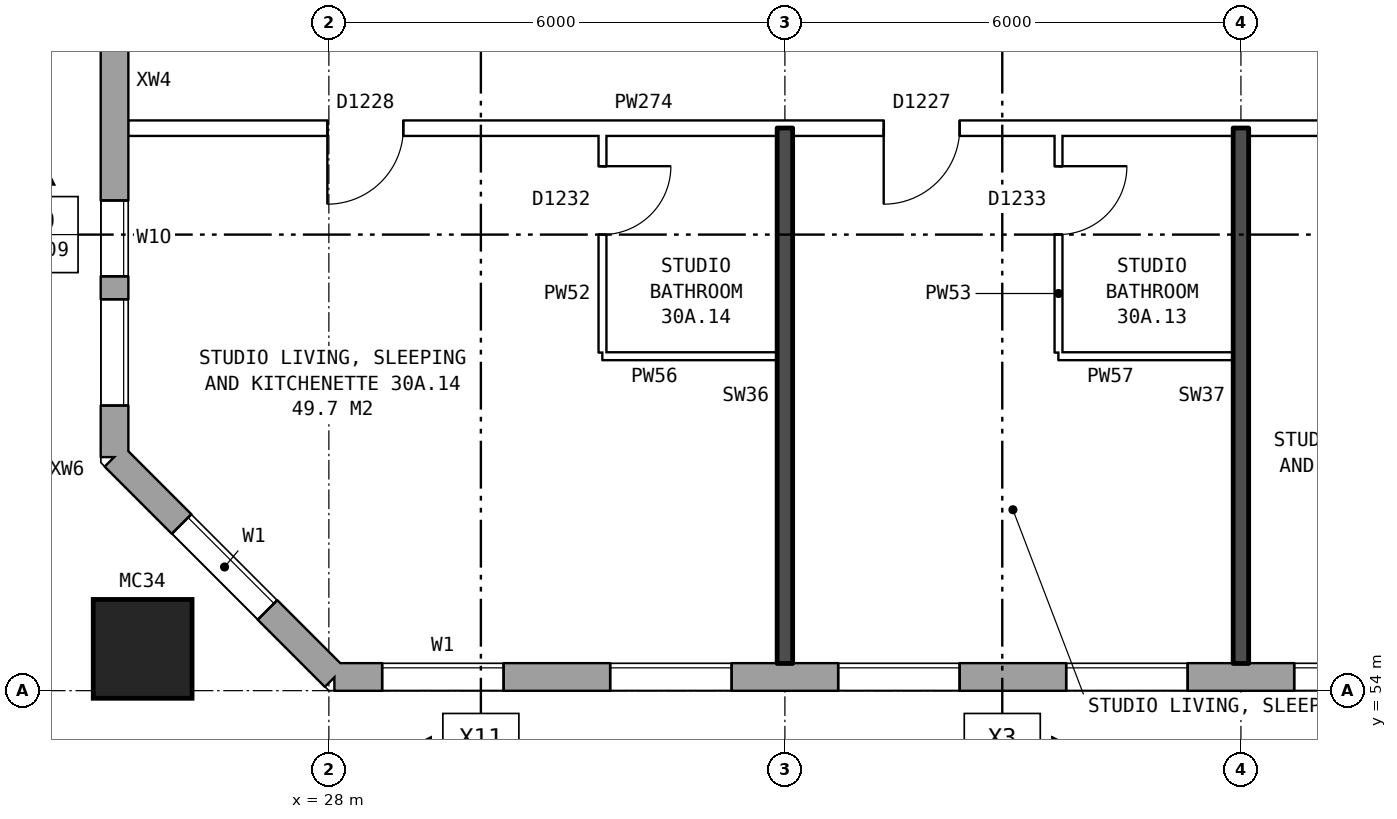
"""IFC4 building model, lengths in metres.
Left out: names, types, materials, properties, quantities, classifications, styles, units other than length and angle.
Written with IfcOpenShell. Run it as: python <this file> out.ifc"""

import sys

from ifc_helpers import new_model, si_unit, direction, frame, frame_2d, origin, origin_2d, place, context, subcontext, project, spatial, rectangle, hollow_rectangle, extrude, element, fill, save


model = new_model("IFC4")
c1 = context("Model", 3, precision=1e-05, world=origin(), true_north=direction((0.0, 1.0)))
c2 = subcontext(c1, "Body", "Model", "MODEL_VIEW")
j1 = project(units=[si_unit("LENGTHUNIT", "METRE"), si_unit("PLANEANGLEUNIT", "RADIAN")], contexts=[c1])
p1 = place(None, origin())
s1 = spatial("IfcSite", under=j1, at=p1, CompositionType="ELEMENT")
p2 = place(p1, origin())
s2 = spatial("IfcBuilding", under=s1, at=p2, CompositionType="ELEMENT")
p3 = place(p2, frame((0.0, 0.0, 108.8)))
s3 = spatial("IfcBuildingStorey", under=s2, at=p3, CompositionType="ELEMENT", Elevation=108.8)
p4 = place(p3, frame((25.55, 54.55, 0.0), z_axis=(0.0, 0.0, 1.0), x_axis=(1.0, 0.0, 0.0)))
e1 = element("IfcColumn", 1, at=p4, inside=s3, PredefinedType="COLUMN", context=c2, shape_type="SweptSolid", body=[
    extrude(hollow_rectangle(XDim=1.3, YDim=1.3, WallThickness=0.07, at=origin_2d()), origin(), (0.0, 0.0, 1.0), 3.1),
])
p5 = place(p3, frame((25.18, 57.075, 0.0), z_axis=(0.0, 0.0, 1.0), x_axis=(0.707106781187, -0.707106781187, 0.0)))
e2 = element("IfcWall", 2, at=p5, inside=s3, PredefinedType="STANDARD", context=c2, shape_type="SweptSolid", body=[
    extrude(rectangle(XDim=4.094, YDim=0.36, at=frame_2d((2.047, 0.0))), origin(), (0.0, 0.0, 1.0), 2.85),
])
p6 = place(p5, frame((1.247, 0.0, 0.8)))
e3 = element("IfcOpeningElement", 3, at=p6, cuts=e2, PredefinedType="OPENING", context=c2, shape_type="SweptSolid", body=[
    extrude(rectangle(XDim=1.6, YDim=1.8, at=frame_2d((0.8, 0.9))), frame((0.0, 0.19, 0.0), z_axis=(0.0, -1.0, 0.0), x_axis=(1.0, 0.0, 0.0)), (0.0, 0.0, 1.0), 0.38),
])
p7 = place(p3, frame((28.075, 54.18, 0.0), z_axis=(0.0, 0.0, 1.0), x_axis=(1.0, 0.0, 0.0)))
e4 = element("IfcWall", 4, at=p7, inside=s3, PredefinedType="STANDARD", context=c2, shape_type="SweptSolid", body=[
    extrude(rectangle(XDim=44.851, YDim=0.36, at=frame_2d((22.425, 0.0))), origin(), (0.0, 0.0, 1.0), 2.85),
])
p8 = place(p7, frame((0.625, 0.0, 0.8)))
e5 = element("IfcOpeningElement", 5, at=p8, cuts=e4, PredefinedType="OPENING", context=c2, shape_type="SweptSolid", body=[
    extrude(rectangle(XDim=1.6, YDim=1.8, at=frame_2d((0.8, 0.9))), frame((0.0, 0.19, 0.0), z_axis=(0.0, -1.0, 0.0), x_axis=(1.0, 0.0, 0.0)), (0.0, 0.0, 1.0), 0.38),
])
p9 = place(p7, frame((3.625, 0.0, 0.8)))
e6 = element("IfcOpeningElement", 6, at=p9, cuts=e4, PredefinedType="OPENING", context=c2, shape_type="SweptSolid", body=[
    extrude(rectangle(XDim=1.6, YDim=1.8, at=frame_2d((0.8, 0.9))), frame((0.0, 0.19, 0.0), z_axis=(0.0, -1.0, 0.0), x_axis=(1.0, 0.0, 0.0)), (0.0, 0.0, 1.0), 0.38),
])
p10 = place(p7, frame((6.625, 0.0, 0.8)))
e7 = element("IfcOpeningElement", 7, at=p10, cuts=e4, PredefinedType="OPENING", context=c2, shape_type="SweptSolid", body=[
    extrude(rectangle(XDim=1.6, YDim=1.8, at=frame_2d((0.8, 0.9))), frame((0.0, 0.19, 0.0), z_axis=(0.0, -1.0, 0.0), x_axis=(1.0, 0.0, 0.0)), (0.0, 0.0, 1.0), 0.38),
])
p11 = place(p7, frame((9.625, 0.0, 0.8)))
e8 = element("IfcOpeningElement", 8, at=p11, cuts=e4, PredefinedType="OPENING", context=c2, shape_type="SweptSolid", body=[
    extrude(rectangle(XDim=1.6, YDim=1.8, at=frame_2d((0.8, 0.9))), frame((0.0, 0.19, 0.0), z_axis=(0.0, -1.0, 0.0), x_axis=(1.0, 0.0, 0.0)), (0.0, 0.0, 1.0), 0.38),
])
p12 = place(p7, frame((12.625, 0.0, 0.8)))
e9 = element("IfcOpeningElement", 9, at=p12, cuts=e4, PredefinedType="OPENING", context=c2, shape_type="SweptSolid", body=[
    extrude(rectangle(XDim=1.6, YDim=1.8, at=frame_2d((0.8, 0.9))), frame((0.0, 0.19, 0.0), z_axis=(0.0, -1.0, 0.0), x_axis=(1.0, 0.0, 0.0)), (0.0, 0.0, 1.0), 0.38),
])
p13 = place(p7, frame((14.525, 0.0, 1.4)))
e10 = element("IfcOpeningElement", 10, at=p13, cuts=e4, PredefinedType="OPENING", context=c2, shape_type="SweptSolid", body=[
    extrude(rectangle(XDim=1.2, YDim=1.2, at=frame_2d((0.6, 0.6))), frame((0.0, 0.19, 0.0), z_axis=(0.0, -1.0, 0.0), x_axis=(1.0, 0.0, 0.0)), (0.0, 0.0, 1.0), 0.38),
])
p14 = place(p7, frame((18.625, 0.0, 0.8)))
e11 = element("IfcOpeningElement", 11, at=p14, cuts=e4, PredefinedType="OPENING", context=c2, shape_type="SweptSolid", body=[
    extrude(rectangle(XDim=1.6, YDim=1.8, at=frame_2d((0.8, 0.9))), frame((0.0, 0.19, 0.0), z_axis=(0.0, -1.0, 0.0), x_axis=(1.0, 0.0, 0.0)), (0.0, 0.0, 1.0), 0.38),
])
p15 = place(p7, frame((21.625, 0.0, 0.8)))
e12 = element("IfcOpeningElement", 12, at=p15, cuts=e4, PredefinedType="OPENING", context=c2, shape_type="SweptSolid", body=[
    extrude(rectangle(XDim=1.6, YDim=1.8, at=frame_2d((0.8, 0.9))), frame((0.0, 0.19, 0.0), z_axis=(0.0, -1.0, 0.0), x_axis=(1.0, 0.0, 0.0)), (0.0, 0.0, 1.0), 0.38),
])
p16 = place(p7, frame((24.625, 0.0, 0.8)))
e13 = element("IfcOpeningElement", 13, at=p16, cuts=e4, PredefinedType="OPENING", context=c2, shape_type="SweptSolid", body=[
    extrude(rectangle(XDim=1.6, YDim=1.8, at=frame_2d((0.8, 0.9))), frame((0.0, 0.19, 0.0), z_axis=(0.0, -1.0, 0.0), x_axis=(1.0, 0.0, 0.0)), (0.0, 0.0, 1.0), 0.38),
])
p17 = place(p7, frame((27.075, 0.0, 0.15)))
e14 = element("IfcOpeningElement", 14, at=p17, cuts=e4, PredefinedType="OPENING", context=c2, shape_type="SweptSolid", body=[
    extrude(rectangle(XDim=1.2, YDim=0.9, at=frame_2d((0.6, 0.45))), frame((0.0, 0.19, 0.0), z_axis=(0.0, -1.0, 0.0), x_axis=(1.0, 0.0, 0.0)), (0.0, 0.0, 1.0), 0.38),
])
p18 = place(p7, frame((30.625, 0.0, 0.8)))
e15 = element("IfcOpeningElement", 15, at=p18, cuts=e4, PredefinedType="OPENING", context=c2, shape_type="SweptSolid", body=[
    extrude(rectangle(XDim=1.6, YDim=1.8, at=frame_2d((0.8, 0.9))), frame((0.0, 0.19, 0.0), z_axis=(0.0, -1.0, 0.0), x_axis=(1.0, 0.0, 0.0)), (0.0, 0.0, 1.0), 0.38),
])
p19 = place(p7, frame((33.625, 0.0, 0.8)))
e16 = element("IfcOpeningElement", 16, at=p19, cuts=e4, PredefinedType="OPENING", context=c2, shape_type="SweptSolid", body=[
    extrude(rectangle(XDim=1.6, YDim=1.8, at=frame_2d((0.8, 0.9))), frame((0.0, 0.19, 0.0), z_axis=(0.0, -1.0, 0.0), x_axis=(1.0, 0.0, 0.0)), (0.0, 0.0, 1.0), 0.38),
])
p20 = place(p7, frame((36.625, 0.0, 0.8)))
e17 = element("IfcOpeningElement", 17, at=p20, cuts=e4, PredefinedType="OPENING", context=c2, shape_type="SweptSolid", body=[
    extrude(rectangle(XDim=1.6, YDim=1.8, at=frame_2d((0.8, 0.9))), frame((0.0, 0.19, 0.0), z_axis=(0.0, -1.0, 0.0), x_axis=(1.0, 0.0, 0.0)), (0.0, 0.0, 1.0), 0.38),
])
p21 = place(p7, frame((39.625, 0.0, 0.8)))
e18 = element("IfcOpeningElement", 18, at=p21, cuts=e4, PredefinedType="OPENING", context=c2, shape_type="SweptSolid", body=[
    extrude(rectangle(XDim=1.6, YDim=1.8, at=frame_2d((0.8, 0.9))), frame((0.0, 0.19, 0.0), z_axis=(0.0, -1.0, 0.0), x_axis=(1.0, 0.0, 0.0)), (0.0, 0.0, 1.0), 0.38),
])
p22 = place(p7, frame((42.625, 0.0, 0.8)))
e19 = element("IfcOpeningElement", 19, at=p22, cuts=e4, PredefinedType="OPENING", context=c2, shape_type="SweptSolid", body=[
    extrude(rectangle(XDim=1.6, YDim=1.8, at=frame_2d((0.8, 0.9))), frame((0.0, 0.19, 0.0), z_axis=(0.0, -1.0, 0.0), x_axis=(1.0, 0.0, 0.0)), (0.0, 0.0, 1.0), 0.38),
])
p23 = place(p7, frame((28.725, 0.0, 1.65)))
e20 = element("IfcOpeningElement", 20, at=p23, cuts=e4, PredefinedType="OPENING", context=c2, shape_type="SweptSolid", body=[
    extrude(rectangle(XDim=1.0, YDim=0.9, at=frame_2d((0.5, 0.45))), frame((0.0, 0.19, 0.0), z_axis=(0.0, -1.0, 0.0), x_axis=(1.0, 0.0, 0.0)), (0.0, 0.0, 1.0), 0.38),
])
p24 = place(p3, frame((25.18, 82.925, 0.0), z_axis=(0.0, 0.0, 1.0), x_axis=(0.0, -1.0, 0.0)))
e21 = element("IfcWall", 21, at=p24, inside=s3, PredefinedType="STANDARD", context=c2, shape_type="SweptSolid", body=[
    extrude(rectangle(XDim=25.851, YDim=0.36, at=frame_2d((12.925, 0.0))), origin(), (0.0, 0.0, 1.0), 2.85),
])
p25 = place(p24, frame((0.3, 0.0, 0.8)))
e22 = element("IfcOpeningElement", 22, at=p25, cuts=e21, PredefinedType="OPENING", context=c2, shape_type="SweptSolid", body=[
    extrude(rectangle(XDim=1.4, YDim=1.8, at=frame_2d((0.7, 0.9))), frame((0.0, 0.19, 0.0), z_axis=(0.0, -1.0, 0.0), x_axis=(1.0, 0.0, 0.0)), (0.0, 0.0, 1.0), 0.38),
])
p26 = place(p24, frame((5.525, 0.0, 1.4)))
e23 = element("IfcOpeningElement", 23, at=p26, cuts=e21, PredefinedType="OPENING", context=c2, shape_type="SweptSolid", body=[
    extrude(rectangle(XDim=1.4, YDim=1.2, at=frame_2d((0.7, 0.6))), frame((0.0, 0.19, 0.0), z_axis=(0.0, -1.0, 0.0), x_axis=(1.0, 0.0, 0.0)), (0.0, 0.0, 1.0), 0.38),
])
p27 = place(p24, frame((7.625, 0.0, 0.8)))
e24 = element("IfcOpeningElement", 24, at=p27, cuts=e21, PredefinedType="OPENING", context=c2, shape_type="SweptSolid", body=[
    extrude(rectangle(XDim=1.6, YDim=1.8, at=frame_2d((0.8, 0.9))), frame((0.0, 0.19, 0.0), z_axis=(0.0, -1.0, 0.0), x_axis=(1.0, 0.0, 0.0)), (0.0, 0.0, 1.0), 0.38),
])
p28 = place(p24, frame((10.625, 0.0, 0.8)))
e25 = element("IfcOpeningElement", 25, at=p28, cuts=e21, PredefinedType="OPENING", context=c2, shape_type="SweptSolid", body=[
    extrude(rectangle(XDim=1.6, YDim=1.8, at=frame_2d((0.8, 0.9))), frame((0.0, 0.19, 0.0), z_axis=(0.0, -1.0, 0.0), x_axis=(1.0, 0.0, 0.0)), (0.0, 0.0, 1.0), 0.38),
])
p29 = place(p24, frame((13.625, 0.0, 0.8)))
e26 = element("IfcOpeningElement", 26, at=p29, cuts=e21, PredefinedType="OPENING", context=c2, shape_type="SweptSolid", body=[
    extrude(rectangle(XDim=1.6, YDim=1.8, at=frame_2d((0.8, 0.9))), frame((0.0, 0.19, 0.0), z_axis=(0.0, -1.0, 0.0), x_axis=(1.0, 0.0, 0.0)), (0.0, 0.0, 1.0), 0.38),
])
p30 = place(p24, frame((16.625, 0.0, 0.8)))
e27 = element("IfcOpeningElement", 27, at=p30, cuts=e21, PredefinedType="OPENING", context=c2, shape_type="SweptSolid", body=[
    extrude(rectangle(XDim=1.6, YDim=1.8, at=frame_2d((0.8, 0.9))), frame((0.0, 0.19, 0.0), z_axis=(0.0, -1.0, 0.0), x_axis=(1.0, 0.0, 0.0)), (0.0, 0.0, 1.0), 0.38),
])
p31 = place(p24, frame((9.525, 0.0, 0.8)))
e28 = element("IfcOpeningElement", 28, at=p31, cuts=e21, PredefinedType="OPENING", context=c2, shape_type="SweptSolid", body=[
    extrude(rectangle(XDim=0.8, YDim=1.8, at=frame_2d((0.4, 0.9))), frame((0.0, 0.19, 0.0), z_axis=(0.0, -1.0, 0.0), x_axis=(1.0, 0.0, 0.0)), (0.0, 0.0, 1.0), 0.38),
])
p32 = place(p24, frame((22.475, 0.0, 0.8)))
e29 = element("IfcOpeningElement", 29, at=p32, cuts=e21, PredefinedType="OPENING", context=c2, shape_type="SweptSolid", body=[
    extrude(rectangle(XDim=1.0, YDim=1.2, at=frame_2d((0.5, 0.6))), frame((0.0, 0.19, 0.0), z_axis=(0.0, -1.0, 0.0), x_axis=(1.0, 0.0, 0.0)), (0.0, 0.0, 1.0), 0.38),
])
p33 = place(p24, frame((2.0, 0.0, 0.8)))
e30 = element("IfcOpeningElement", 30, at=p33, cuts=e21, PredefinedType="OPENING", context=c2, shape_type="SweptSolid", body=[
    extrude(rectangle(XDim=0.8, YDim=1.5, at=frame_2d((0.4, 0.75))), frame((0.0, 0.19, 0.0), z_axis=(0.0, -1.0, 0.0), x_axis=(1.0, 0.0, 0.0)), (0.0, 0.0, 1.0), 0.38),
])
p34 = place(p24, frame((12.525, 0.0, 0.8)))
e31 = element("IfcOpeningElement", 31, at=p34, cuts=e21, PredefinedType="OPENING", context=c2, shape_type="SweptSolid", body=[
    extrude(rectangle(XDim=0.8, YDim=1.8, at=frame_2d((0.4, 0.9))), frame((0.0, 0.19, 0.0), z_axis=(0.0, -1.0, 0.0), x_axis=(1.0, 0.0, 0.0)), (0.0, 0.0, 1.0), 0.38),
])
p35 = place(p24, frame((15.525, 0.0, 0.8)))
e32 = element("IfcOpeningElement", 32, at=p35, cuts=e21, PredefinedType="OPENING", context=c2, shape_type="SweptSolid", body=[
    extrude(rectangle(XDim=0.8, YDim=1.8, at=frame_2d((0.4, 0.9))), frame((0.0, 0.19, 0.0), z_axis=(0.0, -1.0, 0.0), x_axis=(1.0, 0.0, 0.0)), (0.0, 0.0, 1.0), 0.38),
])
p36 = place(p24, frame((18.525, 0.0, 0.8)))
e33 = element("IfcOpeningElement", 33, at=p36, cuts=e21, PredefinedType="OPENING", context=c2, shape_type="SweptSolid", body=[
    extrude(rectangle(XDim=0.8, YDim=1.8, at=frame_2d((0.4, 0.9))), frame((0.0, 0.19, 0.0), z_axis=(0.0, -1.0, 0.0), x_axis=(1.0, 0.0, 0.0)), (0.0, 0.0, 1.0), 0.38),
])
p37 = place(p24, frame((23.775, 0.0, 0.8)))
e34 = element("IfcOpeningElement", 34, at=p37, cuts=e21, PredefinedType="OPENING", context=c2, shape_type="SweptSolid", body=[
    extrude(rectangle(XDim=1.4, YDim=1.8, at=frame_2d((0.7, 0.9))), frame((0.0, 0.19, 0.0), z_axis=(0.0, -1.0, 0.0), x_axis=(1.0, 0.0, 0.0)), (0.0, 0.0, 1.0), 0.38),
])
for number, where, z_axis, x_axis in (
    (35, (31.6, 58.4, 0.0), (0.0, 0.0, 1.0), (1.0, 0.0, 0.0)),
    (36, (37.6, 58.4, 0.0), (0.0, 0.0, 1.0), (1.0, 0.0, 0.0)),
):
    element("IfcWall", number, at=place(p3, frame(where, z_axis=z_axis, x_axis=x_axis)), inside=s3, PredefinedType="PARTITIONING", context=c2, shape_type="SweptSolid", body=[
        extrude(rectangle(XDim=2.3, YDim=0.1, at=frame_2d((1.15, 0.0))), origin(), (0.0, 0.0, 1.0), 2.85),
    ])
p38 = place(p3, frame((25.36, 61.4, 0.0), z_axis=(0.0, 0.0, 1.0), x_axis=(1.0, 0.0, 0.0)))
e37 = element("IfcWall", 37, at=p38, inside=s3, PredefinedType="PARTITIONING", context=c2, shape_type="SweptSolid", body=[
    extrude(rectangle(XDim=20.54, YDim=0.2, at=frame_2d((10.27, 0.0))), origin(), (0.0, 0.0, 1.0), 2.85),
])
p39 = place(p38, frame((15.94, 0.0, 0.0)))
e38 = element("IfcOpeningElement", 38, at=p39, cuts=e37, PredefinedType="OPENING", context=c2, shape_type="SweptSolid", body=[
    extrude(rectangle(XDim=1.0, YDim=2.1, at=frame_2d((0.5, 1.05))), frame((0.0, 0.11, 0.0), z_axis=(0.0, -1.0, 0.0), x_axis=(1.0, 0.0, 0.0)), (0.0, 0.0, 1.0), 0.22),
])
p40 = place(p38, frame((9.94, 0.0, 0.0)))
e39 = element("IfcOpeningElement", 39, at=p40, cuts=e37, PredefinedType="OPENING", context=c2, shape_type="SweptSolid", body=[
    extrude(rectangle(XDim=1.0, YDim=2.1, at=frame_2d((0.5, 1.05))), frame((0.0, 0.11, 0.0), z_axis=(0.0, -1.0, 0.0), x_axis=(1.0, 0.0, 0.0)), (0.0, 0.0, 1.0), 0.22),
])
p41 = place(p38, frame((2.62, 0.0, 0.0)))
e40 = element("IfcOpeningElement", 40, at=p41, cuts=e37, PredefinedType="OPENING", context=c2, shape_type="SweptSolid", body=[
    extrude(rectangle(XDim=1.0, YDim=2.1, at=frame_2d((0.5, 1.05))), frame((0.0, 0.11, 0.0), z_axis=(0.0, -1.0, 0.0), x_axis=(1.0, 0.0, 0.0)), (0.0, 0.0, 1.0), 0.22),
])
p42 = place(p3, frame((31.6, 58.45, 0.0), z_axis=(0.0, 0.0, 1.0), x_axis=(0.0, 1.0, 0.0)))
e41 = element("IfcWall", 41, at=p42, inside=s3, PredefinedType="PARTITIONING", context=c2, shape_type="SweptSolid", body=[
    extrude(rectangle(XDim=2.85, YDim=0.1, at=frame_2d((1.425, 0.0))), origin(), (0.0, 0.0, 1.0), 2.85),
])
p43 = place(p42, frame((1.55, 0.0, 0.0)))
e42 = element("IfcOpeningElement", 42, at=p43, cuts=e41, PredefinedType="OPENING", context=c2, shape_type="SweptSolid", body=[
    extrude(rectangle(XDim=0.9, YDim=2.1, at=frame_2d((0.45, 1.05))), frame((0.0, 0.06, 0.0), z_axis=(0.0, -1.0, 0.0), x_axis=(1.0, 0.0, 0.0)), (0.0, 0.0, 1.0), 0.12),
])
p44 = place(p3, frame((34.0, 54.36, 0.0), z_axis=(0.0, 0.0, 1.0), x_axis=(0.0, 1.0, 0.0)))
e43 = element("IfcWall", 43, at=p44, inside=s3, PredefinedType="SOLIDWALL", context=c2, shape_type="SweptSolid", body=[
    extrude(rectangle(XDim=7.04, YDim=0.2, at=frame_2d((3.52, 0.0))), origin(), (0.0, 0.0, 1.0), 2.85),
])
p45 = place(p3, frame((37.6, 58.45, 0.0), z_axis=(0.0, 0.0, 1.0), x_axis=(0.0, 1.0, 0.0)))
e44 = element("IfcWall", 44, at=p45, inside=s3, PredefinedType="PARTITIONING", context=c2, shape_type="SweptSolid", body=[
    extrude(rectangle(XDim=2.85, YDim=0.1, at=frame_2d((1.425, 0.0))), origin(), (0.0, 0.0, 1.0), 2.85),
])
p46 = place(p45, frame((1.55, 0.0, 0.0)))
e45 = element("IfcOpeningElement", 45, at=p46, cuts=e44, PredefinedType="OPENING", context=c2, shape_type="SweptSolid", body=[
    extrude(rectangle(XDim=0.9, YDim=2.1, at=frame_2d((0.45, 1.05))), frame((0.0, 0.06, 0.0), z_axis=(0.0, -1.0, 0.0), x_axis=(1.0, 0.0, 0.0)), (0.0, 0.0, 1.0), 0.12),
])
p47 = place(p3, frame((40.0, 54.36, 0.0), z_axis=(0.0, 0.0, 1.0), x_axis=(0.0, 1.0, 0.0)))
e46 = element("IfcWall", 46, at=p47, inside=s3, PredefinedType="SOLIDWALL", context=c2, shape_type="SweptSolid", body=[
    extrude(rectangle(XDim=7.04, YDim=0.2, at=frame_2d((3.52, 0.0))), origin(), (0.0, 0.0, 1.0), 2.85),
])
p48 = place(p6, origin())
e47 = element("IfcWindow", 47, at=p48, inside=s3, PartitioningType="SINGLE_PANEL", PredefinedType="WINDOW", context=c2, shape_type="SweptSolid", body=[
    extrude(rectangle(XDim=1.6, YDim=1.8, at=frame_2d((0.8, 0.9))), frame((0.0, 0.15, 0.0), z_axis=(0.0, -1.0, 0.0), x_axis=(1.0, 0.0, 0.0)), (0.0, 0.0, 1.0), 0.06),
])
fill(e3, e47)
p49 = place(p8, origin())
e48 = element("IfcWindow", 48, at=p49, inside=s3, PartitioningType="SINGLE_PANEL", PredefinedType="WINDOW", context=c2, shape_type="SweptSolid", body=[
    extrude(rectangle(XDim=1.6, YDim=1.8, at=frame_2d((0.8, 0.9))), frame((0.0, 0.15, 0.0), z_axis=(0.0, -1.0, 0.0), x_axis=(1.0, 0.0, 0.0)), (0.0, 0.0, 1.0), 0.06),
])
fill(e5, e48)
p50 = place(p9, origin())
e49 = element("IfcWindow", 49, at=p50, inside=s3, PartitioningType="SINGLE_PANEL", PredefinedType="WINDOW", context=c2, shape_type="SweptSolid", body=[
    extrude(rectangle(XDim=1.6, YDim=1.8, at=frame_2d((0.8, 0.9))), frame((0.0, 0.15, 0.0), z_axis=(0.0, -1.0, 0.0), x_axis=(1.0, 0.0, 0.0)), (0.0, 0.0, 1.0), 0.06),
])
fill(e6, e49)
p51 = place(p10, origin())
e50 = element("IfcWindow", 50, at=p51, inside=s3, PartitioningType="SINGLE_PANEL", PredefinedType="WINDOW", context=c2, shape_type="SweptSolid", body=[
    extrude(rectangle(XDim=1.6, YDim=1.8, at=frame_2d((0.8, 0.9))), frame((0.0, 0.15, 0.0), z_axis=(0.0, -1.0, 0.0), x_axis=(1.0, 0.0, 0.0)), (0.0, 0.0, 1.0), 0.06),
])
fill(e7, e50)
p52 = place(p11, origin())
e51 = element("IfcWindow", 51, at=p52, inside=s3, PartitioningType="SINGLE_PANEL", PredefinedType="WINDOW", context=c2, shape_type="SweptSolid", body=[
    extrude(rectangle(XDim=1.6, YDim=1.8, at=frame_2d((0.8, 0.9))), frame((0.0, 0.15, 0.0), z_axis=(0.0, -1.0, 0.0), x_axis=(1.0, 0.0, 0.0)), (0.0, 0.0, 1.0), 0.06),
])
fill(e8, e51)
p53 = place(p12, origin())
e52 = element("IfcWindow", 52, at=p53, inside=s3, PartitioningType="SINGLE_PANEL", PredefinedType="WINDOW", context=c2, shape_type="SweptSolid", body=[
    extrude(rectangle(XDim=1.6, YDim=1.8, at=frame_2d((0.8, 0.9))), frame((0.0, 0.15, 0.0), z_axis=(0.0, -1.0, 0.0), x_axis=(1.0, 0.0, 0.0)), (0.0, 0.0, 1.0), 0.06),
])
fill(e9, e52)
p54 = place(p32, origin())
e53 = element("IfcWindow", 53, at=p54, inside=s3, PartitioningType="SINGLE_PANEL", PredefinedType="WINDOW", context=c2, shape_type="SweptSolid", body=[
    extrude(rectangle(XDim=1.0, YDim=1.2, at=frame_2d((0.5, 0.6))), frame((0.0, 0.15, 0.0), z_axis=(0.0, -1.0, 0.0), x_axis=(1.0, 0.0, 0.0)), (0.0, 0.0, 1.0), 0.06),
])
fill(e29, e53)
p55 = place(p40, frame((1.0, 0.0, 0.0), z_axis=(0.0, 0.0, 1.0), x_axis=(-1.0, 0.0, 0.0)))
e54 = element("IfcDoor", 54, at=p55, inside=s3, OperationType="SINGLE_SWING_RIGHT", PredefinedType="DOOR", context=c2, shape_type="SweptSolid", body=[
    extrude(rectangle(XDim=1.0, YDim=2.1, at=frame_2d((0.5, 1.05))), frame((0.0, 0.025, 0.0), z_axis=(0.0, -1.0, 0.0), x_axis=(1.0, 0.0, 0.0)), (0.0, 0.0, 1.0), 0.05),
])
fill(e39, e54)
p56 = place(p46, frame((0.9, 0.0, 0.0), z_axis=(0.0, 0.0, 1.0), x_axis=(-1.0, 0.0, 0.0)))
e55 = element("IfcDoor", 55, at=p56, inside=s3, OperationType="SINGLE_SWING_LEFT", PredefinedType="DOOR", context=c2, shape_type="SweptSolid", body=[
    extrude(rectangle(XDim=0.9, YDim=2.1, at=frame_2d((0.45, 1.05))), frame((0.0, 0.025, 0.0), z_axis=(0.0, -1.0, 0.0), x_axis=(1.0, 0.0, 0.0)), (0.0, 0.0, 1.0), 0.05),
])
fill(e45, e55)
p57 = place(p41, frame((1.0, 0.0, 0.0), z_axis=(0.0, 0.0, 1.0), x_axis=(-1.0, 0.0, 0.0)))
e56 = element("IfcDoor", 56, at=p57, inside=s3, OperationType="SINGLE_SWING_RIGHT", PredefinedType="DOOR", context=c2, shape_type="SweptSolid", body=[
    extrude(rectangle(XDim=1.0, YDim=2.1, at=frame_2d((0.5, 1.05))), frame((0.0, 0.025, 0.0), z_axis=(0.0, -1.0, 0.0), x_axis=(1.0, 0.0, 0.0)), (0.0, 0.0, 1.0), 0.05),
])
fill(e40, e56)
p58 = place(p43, frame((0.9, 0.0, 0.0), z_axis=(0.0, 0.0, 1.0), x_axis=(-1.0, 0.0, 0.0)))
e57 = element("IfcDoor", 57, at=p58, inside=s3, OperationType="SINGLE_SWING_LEFT", PredefinedType="DOOR", context=c2, shape_type="SweptSolid", body=[
    extrude(rectangle(XDim=0.9, YDim=2.1, at=frame_2d((0.45, 1.05))), frame((0.0, 0.025, 0.0), z_axis=(0.0, -1.0, 0.0), x_axis=(1.0, 0.0, 0.0)), (0.0, 0.0, 1.0), 0.05),
])
fill(e42, e57)
p59 = place(p37, origin())
e58 = element("IfcWindow", 58, at=p59, inside=s3, PartitioningType="SINGLE_PANEL", PredefinedType="WINDOW", context=c2, shape_type="SweptSolid", body=[
    extrude(rectangle(XDim=1.4, YDim=1.8, at=frame_2d((0.7, 0.9))), frame((0.0, 0.15, 0.0), z_axis=(0.0, -1.0, 0.0), x_axis=(1.0, 0.0, 0.0)), (0.0, 0.0, 1.0), 0.06),
])
fill(e34, e58)
save(model, sys.argv[1])
